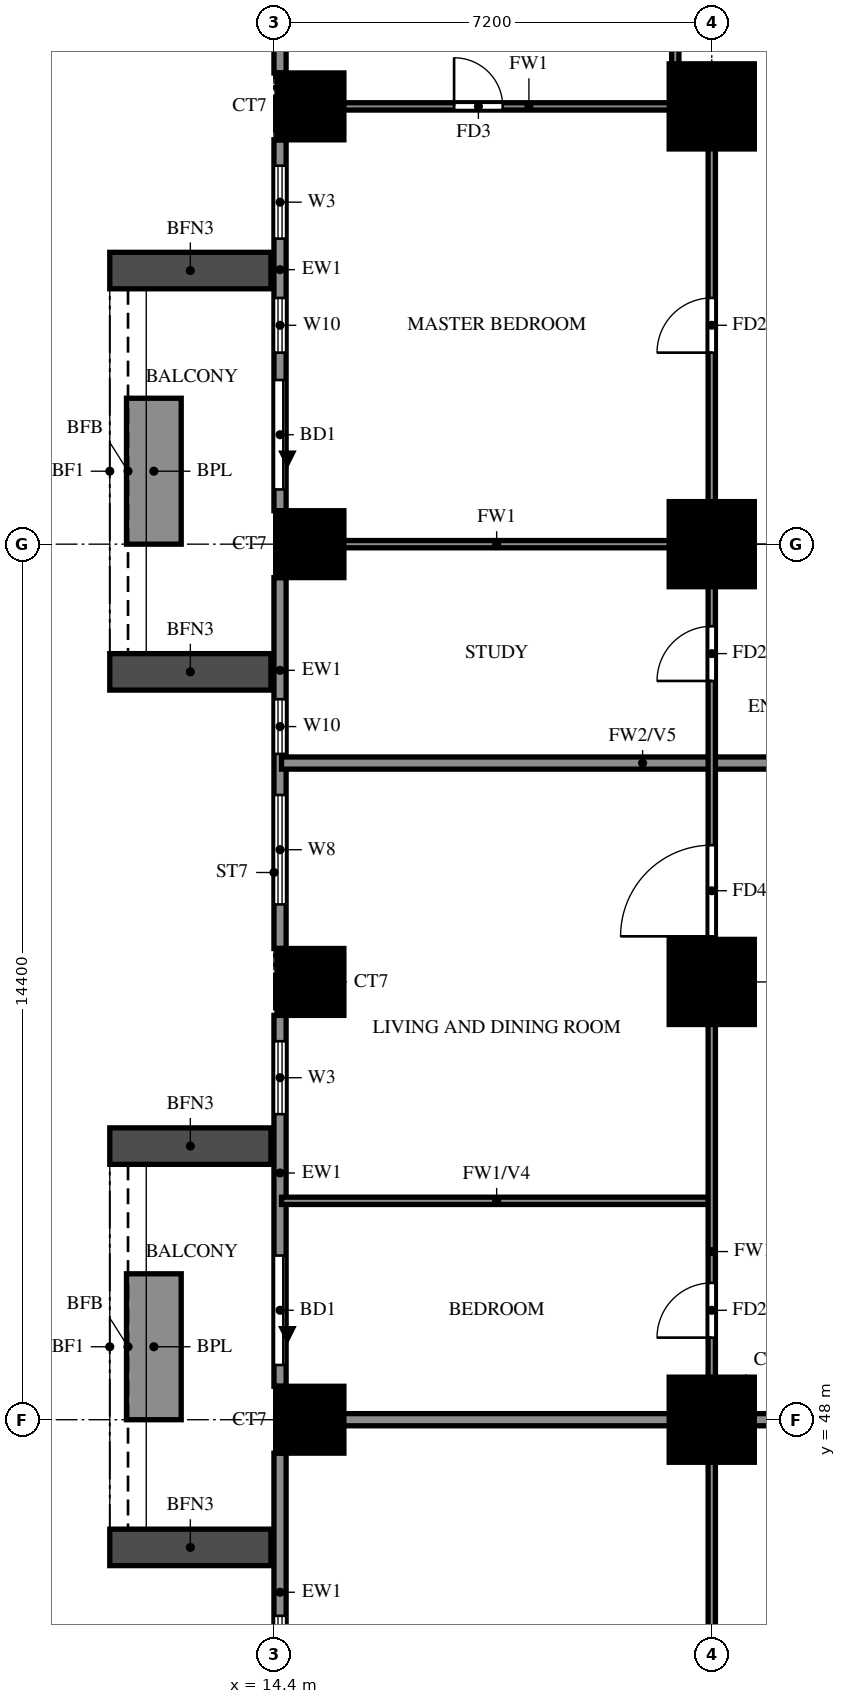
"""IFC4 building model, lengths in metres.
Left out: names, types, materials, properties, quantities, classifications, styles, units other than length and angle.
Written with IfcOpenShell. Run it as: python <this file> out.ifc"""

import sys

from ifc_helpers import new_model, si_unit, direction, frame, frame_2d, origin, origin_2d, place, context, subcontext, project, spatial, rectangle, extrude, source, transform, mapped, element, fill, save


model = new_model("IFC4")
c1 = context("Model", 3, precision=1e-05, world=origin(), true_north=direction((0.0, 1.0)))
c2 = subcontext(c1, "Body", "Model", "MODEL_VIEW")
j1 = project(units=[si_unit("LENGTHUNIT", "METRE"), si_unit("PLANEANGLEUNIT", "RADIAN")], contexts=[c1])
p1 = place(None, origin())
s1 = spatial("IfcSite", under=j1, at=p1, CompositionType="ELEMENT")
p2 = place(p1, origin())
s2 = spatial("IfcBuilding", under=s1, at=p2, CompositionType="ELEMENT")
p3 = place(p2, frame((0.0, 0.0, 41.0)))
s3 = spatial("IfcBuildingStorey", under=s2, at=p3, CompositionType="ELEMENT", Elevation=41.0)
m1 = source(origin(), c2, "Body", "SweptSolid", [
    extrude(rectangle(XDim=1.1, YDim=1.1, at=origin_2d()), origin(), (0.0, 0.0, 1.0), 3.18),
])
p4 = place(p3, frame((15.0, 48.0, 0.0), z_axis=(0.0, 0.0, 1.0), x_axis=(1.0, 0.0, 0.0)))
e1 = element("IfcColumn", 1, at=p4, inside=s3, PredefinedType="COLUMN", context=c2, shape_type="MappedRepresentation", body=[
    mapped(m1, transform((0.0, 0.0, 0.0))),
])
m2 = source(origin(), c2, "Body", "SweptSolid", [
    extrude(rectangle(XDim=1.4, YDim=1.4, at=origin_2d()), origin(), (0.0, 0.0, 1.0), 3.18),
])
p5 = place(p3, frame((21.6, 48.0, 0.0), z_axis=(0.0, 0.0, 1.0), x_axis=(1.0, 0.0, 0.0)))
e2 = element("IfcColumn", 2, at=p5, inside=s3, PredefinedType="COLUMN", context=c2, shape_type="MappedRepresentation", body=[
    mapped(m2, transform((0.0, 0.0, 0.0))),
])
p6 = place(p3, frame((15.0, 55.2, 0.0), z_axis=(0.0, 0.0, 1.0), x_axis=(1.0, 0.0, 0.0)))
e3 = element("IfcColumn", 3, at=p6, inside=s3, PredefinedType="COLUMN", context=c2, shape_type="MappedRepresentation", body=[
    mapped(m1, transform((0.0, 0.0, 0.0))),
])
p7 = place(p3, frame((21.6, 55.2, 0.0), z_axis=(0.0, 0.0, 1.0), x_axis=(1.0, 0.0, 0.0)))
e4 = element("IfcColumn", 4, at=p7, inside=s3, PredefinedType="COLUMN", context=c2, shape_type="MappedRepresentation", body=[
    mapped(m2, transform((0.0, 0.0, 0.0))),
])
p8 = place(p3, frame((15.0, 62.4, 0.0), z_axis=(0.0, 0.0, 1.0), x_axis=(1.0, 0.0, 0.0)))
e5 = element("IfcColumn", 5, at=p8, inside=s3, PredefinedType="COLUMN", context=c2, shape_type="MappedRepresentation", body=[
    mapped(m1, transform((0.0, 0.0, 0.0))),
])
p9 = place(p3, frame((21.6, 62.4, 0.0), z_axis=(0.0, 0.0, 1.0), x_axis=(1.0, 0.0, 0.0)))
e6 = element("IfcColumn", 6, at=p9, inside=s3, PredefinedType="COLUMN", context=c2, shape_type="MappedRepresentation", body=[
    mapped(m2, transform((0.0, 0.0, 0.0))),
])
p10 = place(p3, frame((15.0, 69.6, 0.0), z_axis=(0.0, 0.0, 1.0), x_axis=(1.0, 0.0, 0.0)))
e7 = element("IfcColumn", 7, at=p10, inside=s3, PredefinedType="COLUMN", context=c2, shape_type="MappedRepresentation", body=[
    mapped(m1, transform((0.0, 0.0, 0.0))),
])
p11 = place(p3, frame((21.6, 69.6, 0.0), z_axis=(0.0, 0.0, 1.0), x_axis=(1.0, 0.0, 0.0)))
e8 = element("IfcColumn", 8, at=p11, inside=s3, PredefinedType="COLUMN", context=c2, shape_type="MappedRepresentation", body=[
    mapped(m2, transform((0.0, 0.0, 0.0))),
])
p12 = place(p3, frame((14.5, 76.25, 0.0), z_axis=(0.0, 0.0, 1.0), x_axis=(0.0, -1.0, 0.0)))
e9 = element("IfcWall", 9, at=p12, inside=s3, PredefinedType="SOLIDWALL", context=c2, shape_type="SweptSolid", body=[
    extrude(rectangle(XDim=6.1, YDim=0.2, at=frame_2d((3.05, 0.0))), origin(), (0.0, 0.0, 1.0), 3.18),
])
p13 = place(p12, frame((4.025, 0.0, 1.5)))
e10 = element("IfcOpeningElement", 10, at=p13, cuts=e9, PredefinedType="OPENING", context=c2, shape_type="SweptSolid", body=[
    extrude(rectangle(XDim=0.9, YDim=0.9, at=frame_2d((0.45, 0.45))), frame((0.0, 0.11, 0.0), z_axis=(0.0, -1.0, 0.0), x_axis=(1.0, 0.0, 0.0)), (0.0, 0.0, 1.0), 0.22),
])
p14 = place(p12, frame((0.725, 0.0, 0.6)))
e11 = element("IfcOpeningElement", 11, at=p14, cuts=e9, PredefinedType="OPENING", context=c2, shape_type="SweptSolid", body=[
    extrude(rectangle(XDim=1.8, YDim=2.4, at=frame_2d((0.9, 1.2))), frame((0.0, 0.11, 0.0), z_axis=(0.0, -1.0, 0.0), x_axis=(1.0, 0.0, 0.0)), (0.0, 0.0, 1.0), 0.22),
])
p15 = place(p3, frame((14.5, 69.05, 0.0), z_axis=(0.0, 0.0, 1.0), x_axis=(0.0, -1.0, 0.0)))
e12 = element("IfcWall", 12, at=p15, inside=s3, PredefinedType="SOLIDWALL", context=c2, shape_type="SweptSolid", body=[
    extrude(rectangle(XDim=6.1, YDim=0.2, at=frame_2d((3.05, 0.0))), origin(), (0.0, 0.0, 1.0), 3.18),
])
p16 = place(p15, frame((3.95, 0.0, 0.0)))
e13 = element("IfcOpeningElement", 13, at=p16, cuts=e12, PredefinedType="OPENING", context=c2, shape_type="SweptSolid", body=[
    extrude(rectangle(XDim=1.8, YDim=2.4, at=frame_2d((0.9, 1.2))), frame((0.0, 0.11, 0.0), z_axis=(0.0, -1.0, 0.0), x_axis=(1.0, 0.0, 0.0)), (0.0, 0.0, 1.0), 0.22),
])
p17 = place(p15, frame((0.425, 0.0, 0.6)))
e14 = element("IfcOpeningElement", 14, at=p17, cuts=e12, PredefinedType="OPENING", context=c2, shape_type="SweptSolid", body=[
    extrude(rectangle(XDim=1.2, YDim=2.4, at=frame_2d((0.6, 1.2))), frame((0.0, 0.11, 0.0), z_axis=(0.0, -1.0, 0.0), x_axis=(1.0, 0.0, 0.0)), (0.0, 0.0, 1.0), 0.22),
])
p18 = place(p15, frame((2.6, 0.0, 0.6)))
e15 = element("IfcOpeningElement", 15, at=p18, cuts=e12, PredefinedType="OPENING", context=c2, shape_type="SweptSolid", body=[
    extrude(rectangle(XDim=0.9, YDim=2.4, at=frame_2d((0.45, 1.2))), frame((0.0, 0.11, 0.0), z_axis=(0.0, -1.0, 0.0), x_axis=(1.0, 0.0, 0.0)), (0.0, 0.0, 1.0), 0.22),
])
p19 = place(p3, frame((14.5, 61.85, 0.0), z_axis=(0.0, 0.0, 1.0), x_axis=(0.0, -1.0, 0.0)))
e16 = element("IfcWall", 16, at=p19, inside=s3, PredefinedType="SOLIDWALL", context=c2, shape_type="SweptSolid", body=[
    extrude(rectangle(XDim=6.1, YDim=0.2, at=frame_2d((3.05, 0.0))), origin(), (0.0, 0.0, 1.0), 3.18),
])
p20 = place(p19, frame((3.575, 0.0, 0.6)))
e17 = element("IfcOpeningElement", 17, at=p20, cuts=e16, PredefinedType="OPENING", context=c2, shape_type="SweptSolid", body=[
    extrude(rectangle(XDim=1.8, YDim=2.4, at=frame_2d((0.9, 1.2))), frame((0.0, 0.11, 0.0), z_axis=(0.0, -1.0, 0.0), x_axis=(1.0, 0.0, 0.0)), (0.0, 0.0, 1.0), 0.22),
])
p21 = place(p19, frame((2.0, 0.0, 0.6)))
e18 = element("IfcOpeningElement", 18, at=p21, cuts=e16, PredefinedType="OPENING", context=c2, shape_type="SweptSolid", body=[
    extrude(rectangle(XDim=0.9, YDim=2.4, at=frame_2d((0.45, 1.2))), frame((0.0, 0.11, 0.0), z_axis=(0.0, -1.0, 0.0), x_axis=(1.0, 0.0, 0.0)), (0.0, 0.0, 1.0), 0.22),
])
p22 = place(p3, frame((14.5, 54.65, 0.0), z_axis=(0.0, 0.0, 1.0), x_axis=(0.0, -1.0, 0.0)))
e19 = element("IfcWall", 19, at=p22, inside=s3, PredefinedType="SOLIDWALL", context=c2, shape_type="SweptSolid", body=[
    extrude(rectangle(XDim=6.1, YDim=0.2, at=frame_2d((3.05, 0.0))), origin(), (0.0, 0.0, 1.0), 3.18),
])
p23 = place(p22, frame((3.95, 0.0, 0.0)))
e20 = element("IfcOpeningElement", 20, at=p23, cuts=e19, PredefinedType="OPENING", context=c2, shape_type="SweptSolid", body=[
    extrude(rectangle(XDim=1.8, YDim=2.4, at=frame_2d((0.9, 1.2))), frame((0.0, 0.11, 0.0), z_axis=(0.0, -1.0, 0.0), x_axis=(1.0, 0.0, 0.0)), (0.0, 0.0, 1.0), 0.22),
])
p24 = place(p22, frame((0.425, 0.0, 0.6)))
e21 = element("IfcOpeningElement", 21, at=p24, cuts=e19, PredefinedType="OPENING", context=c2, shape_type="SweptSolid", body=[
    extrude(rectangle(XDim=1.2, YDim=2.4, at=frame_2d((0.6, 1.2))), frame((0.0, 0.11, 0.0), z_axis=(0.0, -1.0, 0.0), x_axis=(1.0, 0.0, 0.0)), (0.0, 0.0, 1.0), 0.22),
])
p25 = place(p3, frame((14.5, 47.45, 0.0), z_axis=(0.0, 0.0, 1.0), x_axis=(0.0, -1.0, 0.0)))
e22 = element("IfcWall", 22, at=p25, inside=s3, PredefinedType="SOLIDWALL", context=c2, shape_type="SweptSolid", body=[
    extrude(rectangle(XDim=6.1, YDim=0.2, at=frame_2d((3.05, 0.0))), origin(), (0.0, 0.0, 1.0), 3.18),
])
p26 = place(p25, frame((2.675, 0.0, 0.6)))
e23 = element("IfcOpeningElement", 23, at=p26, cuts=e22, PredefinedType="OPENING", context=c2, shape_type="SweptSolid", body=[
    extrude(rectangle(XDim=2.4, YDim=2.4, at=frame_2d((1.2, 1.2))), frame((0.0, 0.11, 0.0), z_axis=(0.0, -1.0, 0.0), x_axis=(1.0, 0.0, 0.0)), (0.0, 0.0, 1.0), 0.22),
])
for number, where, z_axis, x_axis in (
    (24, (14.35, 66.9, 0.0), (0.0, 0.0, 1.0), (-1.0, 0.0, 0.0)),
    (25, (14.35, 60.3, 0.0), (0.0, 0.0, 1.0), (-1.0, 0.0, 0.0)),
):
    element("IfcWall", number, at=place(p3, frame(where, z_axis=z_axis, x_axis=x_axis)), inside=s3, PredefinedType="SOLIDWALL", context=c2, shape_type="SweptSolid", body=[
        extrude(rectangle(XDim=2.65, YDim=0.6, at=frame_2d((1.325, 0.0))), origin(), (0.0, 0.0, 1.0), 2.85),
    ])
p27 = place(p3, frame((12.425, 64.8, 0.0), z_axis=(0.0, 0.0, 1.0), x_axis=(0.0, -1.0, 0.0)))
e26 = element("IfcWall", 26, at=p27, inside=s3, PredefinedType="SOLIDWALL", context=c2, shape_type="SweptSolid", body=[
    extrude(rectangle(XDim=2.4, YDim=0.9, at=frame_2d((1.2, 0.0))), origin(), (0.0, 0.0, 1.0), 0.9),
])
for number, where, z_axis, x_axis in (
    (27, (14.35, 52.5, 0.0), (0.0, 0.0, 1.0), (-1.0, 0.0, 0.0)),
    (28, (14.35, 45.9, 0.0), (0.0, 0.0, 1.0), (-1.0, 0.0, 0.0)),
):
    element("IfcWall", number, at=place(p3, frame(where, z_axis=z_axis, x_axis=x_axis)), inside=s3, PredefinedType="SOLIDWALL", context=c2, shape_type="SweptSolid", body=[
        extrude(rectangle(XDim=2.65, YDim=0.6, at=frame_2d((1.325, 0.0))), origin(), (0.0, 0.0, 1.0), 2.85),
    ])
p28 = place(p3, frame((12.425, 50.4, 0.0), z_axis=(0.0, 0.0, 1.0), x_axis=(0.0, -1.0, 0.0)))
e29 = element("IfcWall", 29, at=p28, inside=s3, PredefinedType="SOLIDWALL", context=c2, shape_type="SweptSolid", body=[
    extrude(rectangle(XDim=2.4, YDim=0.9, at=frame_2d((1.2, 0.0))), origin(), (0.0, 0.0, 1.0), 0.9),
])
p29 = place(p3, frame((14.525, 48.0, 0.0), z_axis=(0.0, 0.0, 1.0), x_axis=(1.0, 0.0, 0.0)))
e30 = element("IfcWall", 30, at=p29, inside=s3, PredefinedType="SOLIDWALL", context=c2, shape_type="SweptSolid", body=[
    extrude(rectangle(XDim=19.075, YDim=0.2, at=frame_2d((9.538, 0.0))), origin(), (0.0, 0.0, 1.0), 3.18),
])
p30 = place(p3, frame((14.525, 58.8, 0.0), z_axis=(0.0, 0.0, 1.0), x_axis=(1.0, 0.0, 0.0)))
e31 = element("IfcWall", 31, at=p30, inside=s3, PredefinedType="SOLIDWALL", context=c2, shape_type="SweptSolid", body=[
    extrude(rectangle(XDim=11.875, YDim=0.2, at=frame_2d((5.938, 0.0))), origin(), (0.0, 0.0, 1.0), 2.28),
])
p31 = place(p3, frame((14.525, 51.6, 0.0), z_axis=(0.0, 0.0, 1.0), x_axis=(1.0, 0.0, 0.0)))
e32 = element("IfcWall", 32, at=p31, inside=s3, PredefinedType="PARTITIONING", context=c2, shape_type="SweptSolid", body=[
    extrude(rectangle(XDim=7.075, YDim=0.12, at=frame_2d((3.538, 0.0))), origin(), (0.0, 0.0, 1.0), 2.28),
])
p32 = place(p3, frame((14.525, 62.4, 0.0), z_axis=(0.0, 0.0, 1.0), x_axis=(1.0, 0.0, 0.0)))
e33 = element("IfcWall", 33, at=p32, inside=s3, PredefinedType="PARTITIONING", context=c2, shape_type="SweptSolid", body=[
    extrude(rectangle(XDim=7.075, YDim=0.12, at=frame_2d((3.538, 0.0))), origin(), (0.0, 0.0, 1.0), 3.18),
])
p33 = place(p3, frame((14.525, 69.6, 0.0), z_axis=(0.0, 0.0, 1.0), x_axis=(1.0, 0.0, 0.0)))
e34 = element("IfcWall", 34, at=p33, inside=s3, PredefinedType="PARTITIONING", context=c2, shape_type="SweptSolid", body=[
    extrude(rectangle(XDim=7.075, YDim=0.12, at=frame_2d((3.538, 0.0))), origin(), (0.0, 0.0, 1.0), 3.18),
])
p34 = place(p33, frame((2.837, 0.0, 0.0)))
e35 = element("IfcOpeningElement", 35, at=p34, cuts=e34, PredefinedType="OPENING", context=c2, shape_type="SweptSolid", body=[
    extrude(rectangle(XDim=0.8, YDim=2.1, at=frame_2d((0.4, 1.05))), frame((0.0, 0.07, 0.0), z_axis=(0.0, -1.0, 0.0), x_axis=(1.0, 0.0, 0.0)), (0.0, 0.0, 1.0), 0.14),
])
p35 = place(p3, frame((21.0, 69.6, 0.0), z_axis=(0.0, 0.0, 1.0), x_axis=(0.0, 1.0, 0.0)))
e36 = element("IfcWall", 36, at=p35, inside=s3, PredefinedType="PARTITIONING", context=c2, shape_type="SweptSolid", body=[
    extrude(rectangle(XDim=3.6, YDim=0.12, at=frame_2d((1.8, 0.0))), origin(), (0.0, 0.0, 1.0), 3.18),
])
p36 = place(p3, frame((21.6, 33.725, 0.0), z_axis=(0.0, 0.0, 1.0), x_axis=(0.0, 1.0, 0.0)))
e37 = element("IfcWall", 37, at=p36, inside=s3, PredefinedType="PARTITIONING", context=c2, shape_type="SweptSolid", body=[
    extrude(rectangle(XDim=35.875, YDim=0.12, at=frame_2d((17.938, 0.0))), origin(), (0.0, 0.0, 1.0), 3.18),
])
p37 = place(p36, frame((7.775, 0.0, 0.0)))
e38 = element("IfcOpeningElement", 38, at=p37, cuts=e37, PredefinedType="OPENING", context=c2, shape_type="SweptSolid", body=[
    extrude(rectangle(XDim=0.9, YDim=2.1, at=frame_2d((0.45, 1.05))), frame((0.0, 0.07, 0.0), z_axis=(0.0, -1.0, 0.0), x_axis=(1.0, 0.0, 0.0)), (0.0, 0.0, 1.0), 0.14),
])
p38 = place(p36, frame((15.625, 0.0, 0.0)))
e39 = element("IfcOpeningElement", 39, at=p38, cuts=e37, PredefinedType="OPENING", context=c2, shape_type="SweptSolid", body=[
    extrude(rectangle(XDim=0.9, YDim=2.1, at=frame_2d((0.45, 1.05))), frame((0.0, 0.07, 0.0), z_axis=(0.0, -1.0, 0.0), x_axis=(1.0, 0.0, 0.0)), (0.0, 0.0, 1.0), 0.14),
])
p39 = place(p36, frame((22.225, 0.0, 0.0)))
e40 = element("IfcOpeningElement", 40, at=p39, cuts=e37, PredefinedType="OPENING", context=c2, shape_type="SweptSolid", body=[
    extrude(rectangle(XDim=1.5, YDim=2.1, at=frame_2d((0.75, 1.05))), frame((0.0, 0.07, 0.0), z_axis=(0.0, -1.0, 0.0), x_axis=(1.0, 0.0, 0.0)), (0.0, 0.0, 1.0), 0.14),
])
p40 = place(p36, frame((26.425, 0.0, 0.0)))
e41 = element("IfcOpeningElement", 41, at=p40, cuts=e37, PredefinedType="OPENING", context=c2, shape_type="SweptSolid", body=[
    extrude(rectangle(XDim=0.9, YDim=2.1, at=frame_2d((0.45, 1.05))), frame((0.0, 0.07, 0.0), z_axis=(0.0, -1.0, 0.0), x_axis=(1.0, 0.0, 0.0)), (0.0, 0.0, 1.0), 0.14),
])
p41 = place(p36, frame((31.825, 0.0, 0.0)))
e42 = element("IfcOpeningElement", 42, at=p41, cuts=e37, PredefinedType="OPENING", context=c2, shape_type="SweptSolid", body=[
    extrude(rectangle(XDim=0.9, YDim=2.1, at=frame_2d((0.45, 1.05))), frame((0.0, 0.07, 0.0), z_axis=(0.0, -1.0, 0.0), x_axis=(1.0, 0.0, 0.0)), (0.0, 0.0, 1.0), 0.14),
])
p42 = place(p16, origin())
e43 = element("IfcDoor", 43, at=p42, inside=s3, OperationType="DOUBLE_DOOR_SLIDING", PredefinedType="DOOR", context=c2, shape_type="SweptSolid", body=[
    extrude(rectangle(XDim=1.8, YDim=2.4, at=frame_2d((0.9, 1.2))), frame((0.0, 0.025, 0.0), z_axis=(0.0, -1.0, 0.0), x_axis=(1.0, 0.0, 0.0)), (0.0, 0.0, 1.0), 0.05),
])
fill(e13, e43)
p43 = place(p17, origin())
e44 = element("IfcWindow", 44, at=p43, inside=s3, PartitioningType="SINGLE_PANEL", PredefinedType="WINDOW", context=c2, shape_type="SweptSolid", body=[
    extrude(rectangle(XDim=1.2, YDim=2.4, at=frame_2d((0.6, 1.2))), frame((0.0, 0.03, 0.0), z_axis=(0.0, -1.0, 0.0), x_axis=(1.0, 0.0, 0.0)), (0.0, 0.0, 1.0), 0.06),
])
fill(e14, e44)
p44 = place(p18, origin())
e45 = element("IfcWindow", 45, at=p44, inside=s3, PartitioningType="SINGLE_PANEL", PredefinedType="WINDOW", context=c2, shape_type="SweptSolid", body=[
    extrude(rectangle(XDim=0.9, YDim=2.4, at=frame_2d((0.45, 1.2))), frame((0.0, 0.03, 0.0), z_axis=(0.0, -1.0, 0.0), x_axis=(1.0, 0.0, 0.0)), (0.0, 0.0, 1.0), 0.06),
])
fill(e15, e45)
p45 = place(p20, origin())
e46 = element("IfcWindow", 46, at=p45, inside=s3, PartitioningType="DOUBLE_PANEL_VERTICAL", PredefinedType="WINDOW", context=c2, shape_type="SweptSolid", body=[
    extrude(rectangle(XDim=1.8, YDim=2.4, at=frame_2d((0.9, 1.2))), frame((0.0, 0.03, 0.0), z_axis=(0.0, -1.0, 0.0), x_axis=(1.0, 0.0, 0.0)), (0.0, 0.0, 1.0), 0.06),
])
fill(e17, e46)
p46 = place(p21, origin())
e47 = element("IfcWindow", 47, at=p46, inside=s3, PartitioningType="SINGLE_PANEL", PredefinedType="WINDOW", context=c2, shape_type="SweptSolid", body=[
    extrude(rectangle(XDim=0.9, YDim=2.4, at=frame_2d((0.45, 1.2))), frame((0.0, 0.03, 0.0), z_axis=(0.0, -1.0, 0.0), x_axis=(1.0, 0.0, 0.0)), (0.0, 0.0, 1.0), 0.06),
])
fill(e18, e47)
p47 = place(p23, origin())
e48 = element("IfcDoor", 48, at=p47, inside=s3, OperationType="DOUBLE_DOOR_SLIDING", PredefinedType="DOOR", context=c2, shape_type="SweptSolid", body=[
    extrude(rectangle(XDim=1.8, YDim=2.4, at=frame_2d((0.9, 1.2))), frame((0.0, 0.025, 0.0), z_axis=(0.0, -1.0, 0.0), x_axis=(1.0, 0.0, 0.0)), (0.0, 0.0, 1.0), 0.05),
])
fill(e20, e48)
p48 = place(p24, origin())
e49 = element("IfcWindow", 49, at=p48, inside=s3, PartitioningType="SINGLE_PANEL", PredefinedType="WINDOW", context=c2, shape_type="SweptSolid", body=[
    extrude(rectangle(XDim=1.2, YDim=2.4, at=frame_2d((0.6, 1.2))), frame((0.0, 0.03, 0.0), z_axis=(0.0, -1.0, 0.0), x_axis=(1.0, 0.0, 0.0)), (0.0, 0.0, 1.0), 0.06),
])
fill(e21, e49)
p49 = place(p26, origin())
e50 = element("IfcWindow", 50, at=p49, inside=s3, PartitioningType="DOUBLE_PANEL_VERTICAL", PredefinedType="WINDOW", context=c2, shape_type="SweptSolid", body=[
    extrude(rectangle(XDim=2.4, YDim=2.4, at=frame_2d((1.2, 1.2))), frame((0.0, 0.03, 0.0), z_axis=(0.0, -1.0, 0.0), x_axis=(1.0, 0.0, 0.0)), (0.0, 0.0, 1.0), 0.06),
])
fill(e23, e50)
p50 = place(p38, origin())
e51 = element("IfcDoor", 51, at=p50, inside=s3, OperationType="SINGLE_SWING_LEFT", PredefinedType="DOOR", context=c2, shape_type="SweptSolid", body=[
    extrude(rectangle(XDim=0.9, YDim=2.1, at=frame_2d((0.45, 1.05))), frame((0.0, 0.025, 0.0), z_axis=(0.0, -1.0, 0.0), x_axis=(1.0, 0.0, 0.0)), (0.0, 0.0, 1.0), 0.05),
])
fill(e39, e51)
p51 = place(p39, origin())
e52 = element("IfcDoor", 52, at=p51, inside=s3, OperationType="SINGLE_SWING_RIGHT", PredefinedType="DOOR", context=c2, shape_type="SweptSolid", body=[
    extrude(rectangle(XDim=1.5, YDim=2.1, at=frame_2d((0.75, 1.05))), frame((0.0, 0.025, 0.0), z_axis=(0.0, -1.0, 0.0), x_axis=(1.0, 0.0, 0.0)), (0.0, 0.0, 1.0), 0.05),
])
fill(e40, e52)
p52 = place(p40, origin())
e53 = element("IfcDoor", 53, at=p52, inside=s3, OperationType="SINGLE_SWING_RIGHT", PredefinedType="DOOR", context=c2, shape_type="SweptSolid", body=[
    extrude(rectangle(XDim=0.9, YDim=2.1, at=frame_2d((0.45, 1.05))), frame((0.0, 0.025, 0.0), z_axis=(0.0, -1.0, 0.0), x_axis=(1.0, 0.0, 0.0)), (0.0, 0.0, 1.0), 0.05),
])
fill(e41, e53)
p53 = place(p41, origin())
e54 = element("IfcDoor", 54, at=p53, inside=s3, OperationType="SINGLE_SWING_LEFT", PredefinedType="DOOR", context=c2, shape_type="SweptSolid", body=[
    extrude(rectangle(XDim=0.9, YDim=2.1, at=frame_2d((0.45, 1.05))), frame((0.0, 0.025, 0.0), z_axis=(0.0, -1.0, 0.0), x_axis=(1.0, 0.0, 0.0)), (0.0, 0.0, 1.0), 0.05),
])
fill(e42, e54)
p54 = place(p34, origin())
e55 = element("IfcDoor", 55, at=p54, inside=s3, OperationType="SINGLE_SWING_LEFT", PredefinedType="DOOR", context=c2, shape_type="SweptSolid", body=[
    extrude(rectangle(XDim=0.8, YDim=2.1, at=frame_2d((0.4, 1.05))), frame((0.0, 0.025, 0.0), z_axis=(0.0, -1.0, 0.0), x_axis=(1.0, 0.0, 0.0)), (0.0, 0.0, 1.0), 0.05),
])
fill(e35, e55)
save(model, sys.argv[1])
